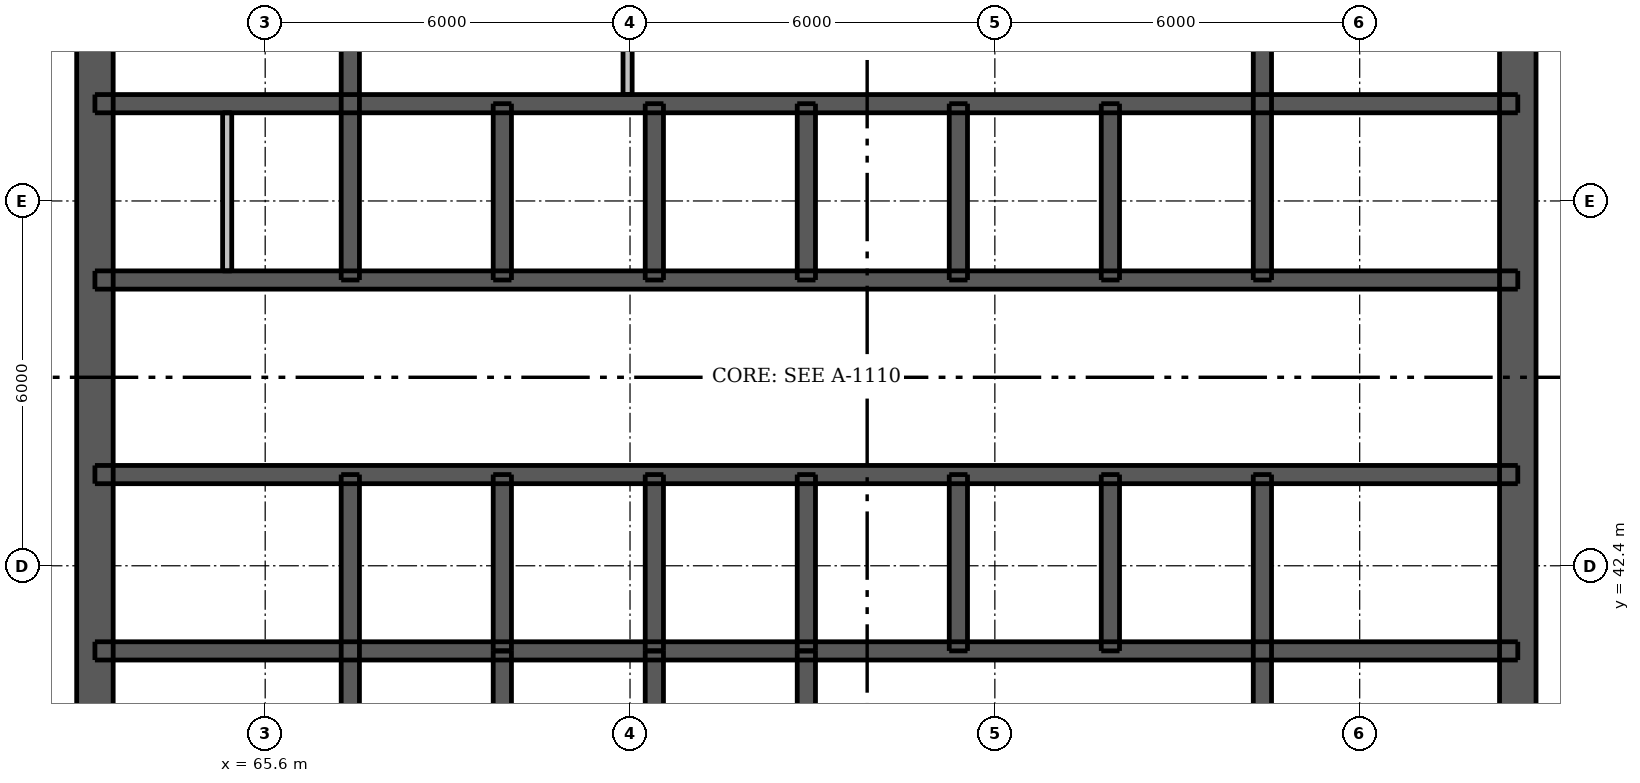
"""IFC4 building model, lengths in metres.
Left out: names, types, materials, properties, quantities, classifications, styles, units other than length and angle.
Written with IfcOpenShell. Run it as: python <this file> out.ifc"""

import sys

from ifc_helpers import new_model, si_unit, direction, frame, frame_2d, origin, place, context, subcontext, project, spatial, rectangle, extrude, element, fill, save


model = new_model("IFC4")
c1 = context("Model", 3, precision=1e-05, world=origin(), true_north=direction((0.0, 1.0)))
c2 = subcontext(c1, "Body", "Model", "MODEL_VIEW")
j1 = project(units=[si_unit("LENGTHUNIT", "METRE"), si_unit("PLANEANGLEUNIT", "RADIAN")], contexts=[c1])
p1 = place(None, origin())
s1 = spatial("IfcSite", under=j1, at=p1, CompositionType="ELEMENT")
p2 = place(p1, origin())
s2 = spatial("IfcBuilding", under=s1, at=p2, CompositionType="ELEMENT")
p3 = place(p2, frame((0.0, 0.0, 203.5)))
s3 = spatial("IfcBuildingStorey", under=s2, at=p3, CompositionType="ELEMENT", Elevation=203.5)
p4 = place(p3, frame((62.8, 33.5, 0.0), z_axis=(0.0, 0.0, 1.0), x_axis=(0.0, 1.0, 0.0)))
e1 = element("IfcWall", 1, at=p4, inside=s3, PredefinedType="SHEAR", context=c2, shape_type="SweptSolid", body=[
    extrude(rectangle(XDim=24.0, YDim=0.6, at=frame_2d((12.0, 0.0))), origin(), (0.0, 0.0, 1.0), 3.05),
])
p5 = place(p4, frame((11.2, 0.0, 0.0)))
e2 = element("IfcOpeningElement", 2, at=p5, cuts=e1, PredefinedType="OPENING", context=c2, shape_type="SweptSolid", body=[
    extrude(rectangle(XDim=1.6, YDim=2.1, at=frame_2d((0.8, 1.05))), frame((0.0, 0.31, 0.0), z_axis=(0.0, -1.0, 0.0), x_axis=(1.0, 0.0, 0.0)), (0.0, 0.0, 1.0), 0.62),
])
p6 = place(p3, frame((86.2, 33.5, 0.0), z_axis=(0.0, 0.0, 1.0), x_axis=(0.0, 1.0, 0.0)))
e3 = element("IfcWall", 3, at=p6, inside=s3, PredefinedType="SHEAR", context=c2, shape_type="SweptSolid", body=[
    extrude(rectangle(XDim=24.0, YDim=0.6, at=frame_2d((12.0, 0.0))), origin(), (0.0, 0.0, 1.0), 3.05),
])
p7 = place(p6, frame((11.2, 0.0, 0.0)))
e4 = element("IfcOpeningElement", 4, at=p7, cuts=e3, PredefinedType="OPENING", context=c2, shape_type="SweptSolid", body=[
    extrude(rectangle(XDim=1.6, YDim=2.1, at=frame_2d((0.8, 1.05))), frame((0.0, 0.31, 0.0), z_axis=(0.0, -1.0, 0.0), x_axis=(1.0, 0.0, 0.0)), (0.0, 0.0, 1.0), 0.62),
])
p8 = place(p3, frame((62.8, 41.0, 0.0), z_axis=(0.0, 0.0, 1.0), x_axis=(1.0, 0.0, 0.0)))
e5 = element("IfcWall", 5, at=p8, inside=s3, PredefinedType="SHEAR", context=c2, shape_type="SweptSolid", body=[
    extrude(rectangle(XDim=23.4, YDim=0.3, at=frame_2d((11.7, 0.0))), origin(), (0.0, 0.0, 1.0), 3.05),
])
p9 = place(p3, frame((62.8, 43.9, 0.0), z_axis=(0.0, 0.0, 1.0), x_axis=(1.0, 0.0, 0.0)))
e6 = element("IfcWall", 6, at=p9, inside=s3, PredefinedType="SHEAR", context=c2, shape_type="SweptSolid", body=[
    extrude(rectangle(XDim=23.4, YDim=0.3, at=frame_2d((11.7, 0.0))), origin(), (0.0, 0.0, 1.0), 3.05),
])
p10 = place(p9, frame((1.725, 0.0, 0.0)))
e7 = element("IfcOpeningElement", 7, at=p10, cuts=e6, PredefinedType="OPENING", context=c2, shape_type="SweptSolid", body=[
    extrude(rectangle(XDim=0.9, YDim=2.1, at=frame_2d((0.45, 1.05))), frame((0.0, 0.16, 0.0), z_axis=(0.0, -1.0, 0.0), x_axis=(1.0, 0.0, 0.0)), (0.0, 0.0, 1.0), 0.32),
])
p11 = place(p9, frame((20.775, 0.0, 0.0)))
e8 = element("IfcOpeningElement", 8, at=p11, cuts=e6, PredefinedType="OPENING", context=c2, shape_type="SweptSolid", body=[
    extrude(rectangle(XDim=0.9, YDim=2.1, at=frame_2d((0.45, 1.05))), frame((0.0, 0.16, 0.0), z_axis=(0.0, -1.0, 0.0), x_axis=(1.0, 0.0, 0.0)), (0.0, 0.0, 1.0), 0.32),
])
p12 = place(p9, frame((5.0, 0.0, 0.0)))
e9 = element("IfcOpeningElement", 9, at=p12, cuts=e6, PredefinedType="OPENING", context=c2, shape_type="SweptSolid", body=[
    extrude(rectangle(XDim=0.9, YDim=2.1, at=frame_2d((0.45, 1.05))), frame((0.0, 0.16, 0.0), z_axis=(0.0, -1.0, 0.0), x_axis=(1.0, 0.0, 0.0)), (0.0, 0.0, 1.0), 0.32),
])
p13 = place(p9, frame((7.5, 0.0, 0.0)))
e10 = element("IfcOpeningElement", 10, at=p13, cuts=e6, PredefinedType="OPENING", context=c2, shape_type="SweptSolid", body=[
    extrude(rectangle(XDim=0.9, YDim=2.1, at=frame_2d((0.45, 1.05))), frame((0.0, 0.16, 0.0), z_axis=(0.0, -1.0, 0.0), x_axis=(1.0, 0.0, 0.0)), (0.0, 0.0, 1.0), 0.32),
])
p14 = place(p9, frame((12.5, 0.0, 0.0)))
e11 = element("IfcOpeningElement", 11, at=p14, cuts=e6, PredefinedType="OPENING", context=c2, shape_type="SweptSolid", body=[
    extrude(rectangle(XDim=0.9, YDim=2.1, at=frame_2d((0.45, 1.05))), frame((0.0, 0.16, 0.0), z_axis=(0.0, -1.0, 0.0), x_axis=(1.0, 0.0, 0.0)), (0.0, 0.0, 1.0), 0.32),
])
p15 = place(p9, frame((15.0, 0.0, 0.0)))
e12 = element("IfcOpeningElement", 12, at=p15, cuts=e6, PredefinedType="OPENING", context=c2, shape_type="SweptSolid", body=[
    extrude(rectangle(XDim=0.9, YDim=2.1, at=frame_2d((0.45, 1.05))), frame((0.0, 0.16, 0.0), z_axis=(0.0, -1.0, 0.0), x_axis=(1.0, 0.0, 0.0)), (0.0, 0.0, 1.0), 0.32),
])
p16 = place(p3, frame((62.8, 47.1, 0.0), z_axis=(0.0, 0.0, 1.0), x_axis=(1.0, 0.0, 0.0)))
e13 = element("IfcWall", 13, at=p16, inside=s3, PredefinedType="SHEAR", context=c2, shape_type="SweptSolid", body=[
    extrude(rectangle(XDim=23.4, YDim=0.3, at=frame_2d((11.7, 0.0))), origin(), (0.0, 0.0, 1.0), 3.05),
])
p17 = place(p16, frame((0.788, 0.0, 0.0)))
e14 = element("IfcOpeningElement", 14, at=p17, cuts=e13, PredefinedType="OPENING", context=c2, shape_type="SweptSolid", body=[
    extrude(rectangle(XDim=0.9, YDim=2.1, at=frame_2d((0.45, 1.05))), frame((0.0, 0.16, 0.0), z_axis=(0.0, -1.0, 0.0), x_axis=(1.0, 0.0, 0.0)), (0.0, 0.0, 1.0), 0.32),
])
p18 = place(p16, frame((2.663, 0.0, 0.0)))
e15 = element("IfcOpeningElement", 15, at=p18, cuts=e13, PredefinedType="OPENING", context=c2, shape_type="SweptSolid", body=[
    extrude(rectangle(XDim=0.9, YDim=2.1, at=frame_2d((0.45, 1.05))), frame((0.0, 0.16, 0.0), z_axis=(0.0, -1.0, 0.0), x_axis=(1.0, 0.0, 0.0)), (0.0, 0.0, 1.0), 0.32),
])
p19 = place(p16, frame((20.775, 0.0, 0.0)))
e16 = element("IfcOpeningElement", 16, at=p19, cuts=e13, PredefinedType="OPENING", context=c2, shape_type="SweptSolid", body=[
    extrude(rectangle(XDim=0.9, YDim=2.1, at=frame_2d((0.45, 1.05))), frame((0.0, 0.16, 0.0), z_axis=(0.0, -1.0, 0.0), x_axis=(1.0, 0.0, 0.0)), (0.0, 0.0, 1.0), 0.32),
])
p20 = place(p16, frame((4.9, 0.0, 0.0)))
e17 = element("IfcOpeningElement", 17, at=p20, cuts=e13, PredefinedType="OPENING", context=c2, shape_type="SweptSolid", body=[
    extrude(rectangle(XDim=1.1, YDim=2.1, at=frame_2d((0.55, 1.05))), frame((0.0, 0.16, 0.0), z_axis=(0.0, -1.0, 0.0), x_axis=(1.0, 0.0, 0.0)), (0.0, 0.0, 1.0), 0.32),
])
p21 = place(p16, frame((7.4, 0.0, 0.0)))
e18 = element("IfcOpeningElement", 18, at=p21, cuts=e13, PredefinedType="OPENING", context=c2, shape_type="SweptSolid", body=[
    extrude(rectangle(XDim=1.1, YDim=2.1, at=frame_2d((0.55, 1.05))), frame((0.0, 0.16, 0.0), z_axis=(0.0, -1.0, 0.0), x_axis=(1.0, 0.0, 0.0)), (0.0, 0.0, 1.0), 0.32),
])
p22 = place(p16, frame((9.9, 0.0, 0.0)))
e19 = element("IfcOpeningElement", 19, at=p22, cuts=e13, PredefinedType="OPENING", context=c2, shape_type="SweptSolid", body=[
    extrude(rectangle(XDim=1.1, YDim=2.1, at=frame_2d((0.55, 1.05))), frame((0.0, 0.16, 0.0), z_axis=(0.0, -1.0, 0.0), x_axis=(1.0, 0.0, 0.0)), (0.0, 0.0, 1.0), 0.32),
])
p23 = place(p16, frame((12.4, 0.0, 0.0)))
e20 = element("IfcOpeningElement", 20, at=p23, cuts=e13, PredefinedType="OPENING", context=c2, shape_type="SweptSolid", body=[
    extrude(rectangle(XDim=1.1, YDim=2.1, at=frame_2d((0.55, 1.05))), frame((0.0, 0.16, 0.0), z_axis=(0.0, -1.0, 0.0), x_axis=(1.0, 0.0, 0.0)), (0.0, 0.0, 1.0), 0.32),
])
p24 = place(p16, frame((14.9, 0.0, 0.0)))
e21 = element("IfcOpeningElement", 21, at=p24, cuts=e13, PredefinedType="OPENING", context=c2, shape_type="SweptSolid", body=[
    extrude(rectangle(XDim=1.1, YDim=2.1, at=frame_2d((0.55, 1.05))), frame((0.0, 0.16, 0.0), z_axis=(0.0, -1.0, 0.0), x_axis=(1.0, 0.0, 0.0)), (0.0, 0.0, 1.0), 0.32),
])
p25 = place(p16, frame((17.4, 0.0, 0.0)))
e22 = element("IfcOpeningElement", 22, at=p25, cuts=e13, PredefinedType="OPENING", context=c2, shape_type="SweptSolid", body=[
    extrude(rectangle(XDim=1.1, YDim=2.1, at=frame_2d((0.55, 1.05))), frame((0.0, 0.16, 0.0), z_axis=(0.0, -1.0, 0.0), x_axis=(1.0, 0.0, 0.0)), (0.0, 0.0, 1.0), 0.32),
])
p26 = place(p3, frame((62.8, 50.0, 0.0), z_axis=(0.0, 0.0, 1.0), x_axis=(1.0, 0.0, 0.0)))
e23 = element("IfcWall", 23, at=p26, inside=s3, PredefinedType="SHEAR", context=c2, shape_type="SweptSolid", body=[
    extrude(rectangle(XDim=23.4, YDim=0.3, at=frame_2d((11.7, 0.0))), origin(), (0.0, 0.0, 1.0), 3.05),
])
p27 = place(p3, frame((67.0, 33.8, 0.0), z_axis=(0.0, 0.0, 1.0), x_axis=(0.0, 1.0, 0.0)))
e24 = element("IfcWall", 24, at=p27, inside=s3, PredefinedType="SHEAR", context=c2, shape_type="SweptSolid", body=[
    extrude(rectangle(XDim=10.1, YDim=0.3, at=frame_2d((5.05, 0.0))), origin(), (0.0, 0.0, 1.0), 3.05),
])
p28 = place(p27, frame((0.5, 0.0, 0.0)))
e25 = element("IfcOpeningElement", 25, at=p28, cuts=e24, PredefinedType="OPENING", context=c2, shape_type="SweptSolid", body=[
    extrude(rectangle(XDim=1.1, YDim=2.1, at=frame_2d((0.55, 1.05))), frame((0.0, 0.16, 0.0), z_axis=(0.0, -1.0, 0.0), x_axis=(1.0, 0.0, 0.0)), (0.0, 0.0, 1.0), 0.32),
])
for number, where, z_axis, x_axis in (
    (26, (67.0, 47.1, 0.0), (0.0, 0.0, 1.0), (0.0, 1.0, 0.0)),
    (27, (82.0, 33.8, 0.0), (0.0, 0.0, 1.0), (0.0, 1.0, 0.0)),
    (28, (82.0, 47.1, 0.0), (0.0, 0.0, 1.0), (0.0, 1.0, 0.0)),
):
    element("IfcWall", number, at=place(p3, frame(where, z_axis=z_axis, x_axis=x_axis)), inside=s3, PredefinedType="SHEAR", context=c2, shape_type="SweptSolid", body=[
        extrude(rectangle(XDim=10.1, YDim=0.3, at=frame_2d((5.05, 0.0))), origin(), (0.0, 0.0, 1.0), 3.05),
    ])
for number, where, z_axis, x_axis in (
    (29, (69.5, 41.0, 0.0), (0.0, 0.0, 1.0), (0.0, 1.0, 0.0)),
    (30, (69.5, 47.1, 0.0), (0.0, 0.0, 1.0), (0.0, 1.0, 0.0)),
    (31, (72.0, 41.0, 0.0), (0.0, 0.0, 1.0), (0.0, 1.0, 0.0)),
    (32, (72.0, 47.1, 0.0), (0.0, 0.0, 1.0), (0.0, 1.0, 0.0)),
    (33, (74.5, 41.0, 0.0), (0.0, 0.0, 1.0), (0.0, 1.0, 0.0)),
    (34, (74.5, 47.1, 0.0), (0.0, 0.0, 1.0), (0.0, 1.0, 0.0)),
    (35, (77.0, 41.0, 0.0), (0.0, 0.0, 1.0), (0.0, 1.0, 0.0)),
    (36, (77.0, 47.1, 0.0), (0.0, 0.0, 1.0), (0.0, 1.0, 0.0)),
    (37, (79.5, 41.0, 0.0), (0.0, 0.0, 1.0), (0.0, 1.0, 0.0)),
    (38, (79.5, 47.1, 0.0), (0.0, 0.0, 1.0), (0.0, 1.0, 0.0)),
    (39, (69.5, 38.1, 0.0), (0.0, 0.0, 1.0), (0.0, 1.0, 0.0)),
    (40, (72.0, 38.1, 0.0), (0.0, 0.0, 1.0), (0.0, 1.0, 0.0)),
    (41, (74.5, 38.1, 0.0), (0.0, 0.0, 1.0), (0.0, 1.0, 0.0)),
):
    element("IfcWall", number, at=place(p3, frame(where, z_axis=z_axis, x_axis=x_axis)), inside=s3, PredefinedType="SHEAR", context=c2, shape_type="SweptSolid", body=[
        extrude(rectangle(XDim=2.9, YDim=0.3, at=frame_2d((1.45, 0.0))), origin(), (0.0, 0.0, 1.0), 3.05),
    ])
p29 = place(p3, frame((64.975, 47.25, 0.0), z_axis=(0.0, 0.0, 1.0), x_axis=(0.0, 1.0, 0.0)))
e42 = element("IfcWall", 42, at=p29, inside=s3, PredefinedType="PLUMBINGWALL", context=c2, shape_type="SweptSolid", body=[
    extrude(rectangle(XDim=2.6, YDim=0.15, at=frame_2d((1.3, 0.0))), origin(), (0.0, 0.0, 1.0), 3.05),
])
p30 = place(p3, frame((71.56, 50.15, 0.0), z_axis=(0.0, 0.0, 1.0), x_axis=(0.0, 1.0, 0.0)))
e43 = element("IfcWall", 43, at=p30, inside=s3, PredefinedType="PLUMBINGWALL", context=c2, shape_type="SweptSolid", body=[
    extrude(rectangle(XDim=6.75, YDim=0.15, at=frame_2d((3.375, 0.0))), origin(), (0.0, 0.0, 1.0), 3.05),
])
p31 = place(p5, origin())
e44 = element("IfcDoor", 44, at=p31, inside=s3, OperationType="DOUBLE_DOOR_SINGLE_SWING", PredefinedType="DOOR", context=c2, shape_type="SweptSolid", body=[
    extrude(rectangle(XDim=1.6, YDim=2.1, at=frame_2d((0.8, 1.05))), frame((0.0, -0.237, 0.0), z_axis=(0.0, -1.0, 0.0), x_axis=(1.0, 0.0, 0.0)), (0.0, 0.0, 1.0), 0.05),
])
fill(e2, e44)
p32 = place(p7, origin())
e45 = element("IfcDoor", 45, at=p32, inside=s3, OperationType="DOUBLE_DOOR_SINGLE_SWING", PredefinedType="DOOR", context=c2, shape_type="SweptSolid", body=[
    extrude(rectangle(XDim=1.6, YDim=2.1, at=frame_2d((0.8, 1.05))), frame((0.0, 0.288, 0.0), z_axis=(0.0, -1.0, 0.0), x_axis=(1.0, 0.0, 0.0)), (0.0, 0.0, 1.0), 0.05),
])
fill(e4, e45)
p33 = place(p10, origin())
e46 = element("IfcDoor", 46, at=p33, inside=s3, OperationType="SINGLE_SWING_LEFT", PredefinedType="DOOR", context=c2, shape_type="SweptSolid", body=[
    extrude(rectangle(XDim=0.9, YDim=2.1, at=frame_2d((0.45, 1.05))), frame((0.0, -0.087, 0.0), z_axis=(0.0, -1.0, 0.0), x_axis=(1.0, 0.0, 0.0)), (0.0, 0.0, 1.0), 0.05),
])
fill(e7, e46)
p34 = place(p11, origin())
e47 = element("IfcDoor", 47, at=p34, inside=s3, OperationType="SINGLE_SWING_LEFT", PredefinedType="DOOR", context=c2, shape_type="SweptSolid", body=[
    extrude(rectangle(XDim=0.9, YDim=2.1, at=frame_2d((0.45, 1.05))), frame((0.0, -0.087, 0.0), z_axis=(0.0, -1.0, 0.0), x_axis=(1.0, 0.0, 0.0)), (0.0, 0.0, 1.0), 0.05),
])
fill(e8, e47)
p35 = place(p17, origin())
e48 = element("IfcDoor", 48, at=p35, inside=s3, OperationType="SINGLE_SWING_LEFT", PredefinedType="DOOR", context=c2, shape_type="SweptSolid", body=[
    extrude(rectangle(XDim=0.9, YDim=2.1, at=frame_2d((0.45, 1.05))), frame((0.0, 0.138, 0.0), z_axis=(0.0, -1.0, 0.0), x_axis=(1.0, 0.0, 0.0)), (0.0, 0.0, 1.0), 0.05),
])
fill(e14, e48)
p36 = place(p18, origin())
e49 = element("IfcDoor", 49, at=p36, inside=s3, OperationType="SINGLE_SWING_RIGHT", PredefinedType="DOOR", context=c2, shape_type="SweptSolid", body=[
    extrude(rectangle(XDim=0.9, YDim=2.1, at=frame_2d((0.45, 1.05))), frame((0.0, 0.138, 0.0), z_axis=(0.0, -1.0, 0.0), x_axis=(1.0, 0.0, 0.0)), (0.0, 0.0, 1.0), 0.05),
])
fill(e15, e49)
p37 = place(p19, origin())
e50 = element("IfcDoor", 50, at=p37, inside=s3, OperationType="SINGLE_SWING_LEFT", PredefinedType="DOOR", context=c2, shape_type="SweptSolid", body=[
    extrude(rectangle(XDim=0.9, YDim=2.1, at=frame_2d((0.45, 1.05))), frame((0.0, 0.138, 0.0), z_axis=(0.0, -1.0, 0.0), x_axis=(1.0, 0.0, 0.0)), (0.0, 0.0, 1.0), 0.05),
])
fill(e16, e50)
p38 = place(p12, origin())
e51 = element("IfcDoor", 51, at=p38, inside=s3, OperationType="SINGLE_SWING_RIGHT", PredefinedType="DOOR", context=c2, shape_type="SweptSolid", body=[
    extrude(rectangle(XDim=0.9, YDim=2.1, at=frame_2d((0.45, 1.05))), frame((0.0, -0.087, 0.0), z_axis=(0.0, -1.0, 0.0), x_axis=(1.0, 0.0, 0.0)), (0.0, 0.0, 1.0), 0.05),
])
fill(e9, e51)
p39 = place(p13, origin())
e52 = element("IfcDoor", 52, at=p39, inside=s3, OperationType="SINGLE_SWING_LEFT", PredefinedType="DOOR", context=c2, shape_type="SweptSolid", body=[
    extrude(rectangle(XDim=0.9, YDim=2.1, at=frame_2d((0.45, 1.05))), frame((0.0, -0.087, 0.0), z_axis=(0.0, -1.0, 0.0), x_axis=(1.0, 0.0, 0.0)), (0.0, 0.0, 1.0), 0.05),
])
fill(e10, e52)
p40 = place(p14, origin())
e53 = element("IfcDoor", 53, at=p40, inside=s3, OperationType="SINGLE_SWING_LEFT", PredefinedType="DOOR", context=c2, shape_type="SweptSolid", body=[
    extrude(rectangle(XDim=0.9, YDim=2.1, at=frame_2d((0.45, 1.05))), frame((0.0, -0.087, 0.0), z_axis=(0.0, -1.0, 0.0), x_axis=(1.0, 0.0, 0.0)), (0.0, 0.0, 1.0), 0.05),
])
fill(e11, e53)
p41 = place(p15, origin())
e54 = element("IfcDoor", 54, at=p41, inside=s3, OperationType="SINGLE_SWING_RIGHT", PredefinedType="DOOR", context=c2, shape_type="SweptSolid", body=[
    extrude(rectangle(XDim=0.9, YDim=2.1, at=frame_2d((0.45, 1.05))), frame((0.0, -0.087, 0.0), z_axis=(0.0, -1.0, 0.0), x_axis=(1.0, 0.0, 0.0)), (0.0, 0.0, 1.0), 0.05),
])
fill(e12, e54)
p42 = place(p20, origin())
e55 = element("IfcDoor", 55, at=p42, inside=s3, OperationType="DOUBLE_DOOR_SLIDING", PredefinedType="DOOR", context=c2, shape_type="SweptSolid", body=[
    extrude(rectangle(XDim=1.1, YDim=2.1, at=frame_2d((0.55, 1.05))), frame((0.0, 0.025, 0.0), z_axis=(0.0, -1.0, 0.0), x_axis=(1.0, 0.0, 0.0)), (0.0, 0.0, 1.0), 0.05),
])
fill(e17, e55)
p43 = place(p21, origin())
e56 = element("IfcDoor", 56, at=p43, inside=s3, OperationType="DOUBLE_DOOR_SLIDING", PredefinedType="DOOR", context=c2, shape_type="SweptSolid", body=[
    extrude(rectangle(XDim=1.1, YDim=2.1, at=frame_2d((0.55, 1.05))), frame((0.0, 0.025, 0.0), z_axis=(0.0, -1.0, 0.0), x_axis=(1.0, 0.0, 0.0)), (0.0, 0.0, 1.0), 0.05),
])
fill(e18, e56)
p44 = place(p22, origin())
e57 = element("IfcDoor", 57, at=p44, inside=s3, OperationType="DOUBLE_DOOR_SLIDING", PredefinedType="DOOR", context=c2, shape_type="SweptSolid", body=[
    extrude(rectangle(XDim=1.1, YDim=2.1, at=frame_2d((0.55, 1.05))), frame((0.0, 0.025, 0.0), z_axis=(0.0, -1.0, 0.0), x_axis=(1.0, 0.0, 0.0)), (0.0, 0.0, 1.0), 0.05),
])
fill(e19, e57)
p45 = place(p23, origin())
e58 = element("IfcDoor", 58, at=p45, inside=s3, OperationType="DOUBLE_DOOR_SLIDING", PredefinedType="DOOR", context=c2, shape_type="SweptSolid", body=[
    extrude(rectangle(XDim=1.1, YDim=2.1, at=frame_2d((0.55, 1.05))), frame((0.0, 0.025, 0.0), z_axis=(0.0, -1.0, 0.0), x_axis=(1.0, 0.0, 0.0)), (0.0, 0.0, 1.0), 0.05),
])
fill(e20, e58)
p46 = place(p24, origin())
e59 = element("IfcDoor", 59, at=p46, inside=s3, OperationType="DOUBLE_DOOR_SLIDING", PredefinedType="DOOR", context=c2, shape_type="SweptSolid", body=[
    extrude(rectangle(XDim=1.1, YDim=2.1, at=frame_2d((0.55, 1.05))), frame((0.0, 0.025, 0.0), z_axis=(0.0, -1.0, 0.0), x_axis=(1.0, 0.0, 0.0)), (0.0, 0.0, 1.0), 0.05),
])
fill(e21, e59)
p47 = place(p25, origin())
e60 = element("IfcDoor", 60, at=p47, inside=s3, OperationType="DOUBLE_DOOR_SLIDING", PredefinedType="DOOR", context=c2, shape_type="SweptSolid", body=[
    extrude(rectangle(XDim=1.1, YDim=2.1, at=frame_2d((0.55, 1.05))), frame((0.0, 0.025, 0.0), z_axis=(0.0, -1.0, 0.0), x_axis=(1.0, 0.0, 0.0)), (0.0, 0.0, 1.0), 0.05),
])
fill(e22, e60)
save(model, sys.argv[1])
